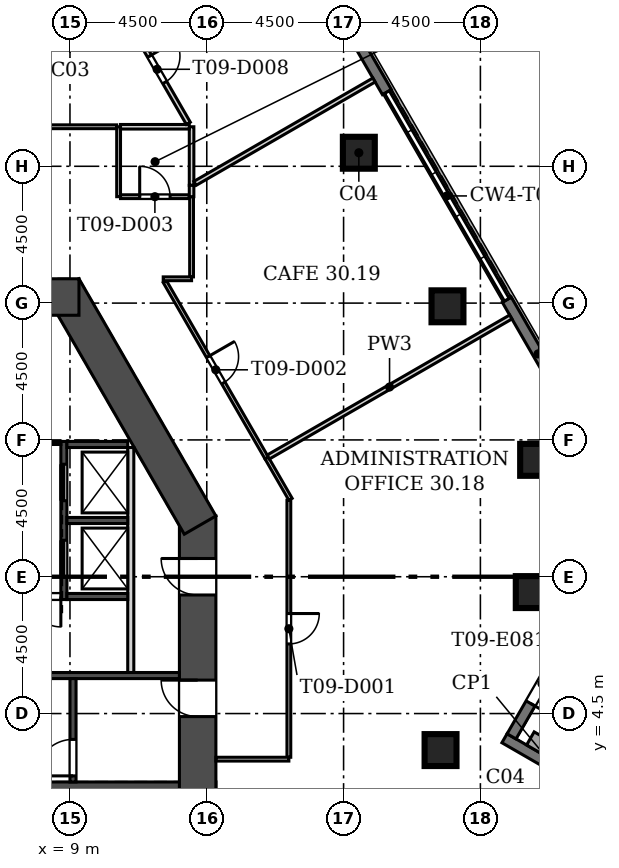
"""IFC4 building model, lengths in metres.
Left out: names, types, materials, properties, quantities, classifications, styles, units other than length and angle.
Written with IfcOpenShell. Run it as: python <this file> out.ifc"""

import sys

from ifc_helpers import new_model, si_unit, direction, frame, frame_2d, origin, origin_2d, place, context, subcontext, project, spatial, polyline, rectangle, outline, extrude, element, fill, save


model = new_model("IFC4")
c1 = context("Model", 3, precision=1e-05, world=origin(), true_north=direction((0.0, 1.0)))
c2 = subcontext(c1, "Body", "Model", "MODEL_VIEW")
j1 = project(units=[si_unit("LENGTHUNIT", "METRE"), si_unit("PLANEANGLEUNIT", "RADIAN")], contexts=[c1])
p1 = place(None, origin())
s1 = spatial("IfcSite", under=j1, at=p1, CompositionType="ELEMENT")
p2 = place(p1, origin())
s2 = spatial("IfcBuilding", under=s1, at=p2, CompositionType="ELEMENT")
p3 = place(p2, frame((0.0, 0.0, 137.5)))
s3 = spatial("IfcBuildingStorey", under=s2, at=p3, CompositionType="ELEMENT", Elevation=137.5)
for number, where, z_axis, x_axis in (
    (1, (21.19, 3.299, 0.0), (0.0, 0.0, 1.0), (1.0, 0.0, 0.0)),
    (2, (24.19, 8.495, 0.0), (0.0, 0.0, 1.0), (1.0, 0.0, 0.0)),
    (3, (24.333, 12.844, 0.0), (0.0, 0.0, 1.0), (1.0, 0.0, 0.0)),
    (4, (21.417, 17.895, 0.0), (0.0, 0.0, 1.0), (1.0, 0.0, 0.0)),
    (5, (18.502, 22.945, 0.0), (0.0, 0.0, 1.0), (1.0, 0.0, 0.0)),
):
    element("IfcColumn", number, at=place(p3, frame(where, z_axis=z_axis, x_axis=x_axis)), inside=s3, PredefinedType="COLUMN", context=c2, shape_type="SweptSolid", body=[
        extrude(rectangle(XDim=1.05, YDim=1.05, at=origin_2d()), origin(), (0.0, 0.0, 1.0), 5.4),
    ])
p4 = place(p3, frame((-13.8, 1.65, 0.0), z_axis=(0.0, 0.0, 1.0), x_axis=(1.0, 0.0, 0.0)))
e6 = element("IfcWall", 6, at=p4, inside=s3, PredefinedType="SHEAR", context=c2, shape_type="SweptSolid", body=[
    extrude(rectangle(XDim=27.6, YDim=1.2, at=frame_2d((13.8, 0.0))), origin(), (0.0, 0.0, 1.0), 5.4),
])
p5 = place(p3, frame((13.2, 1.05, 0.0), z_axis=(0.0, 0.0, 1.0), x_axis=(0.0, 1.0, 0.0)))
e7 = element("IfcWall", 7, at=p5, inside=s3, PredefinedType="SHEAR", context=c2, shape_type="SweptSolid", body=[
    extrude(rectangle(XDim=9.949, YDim=1.2, at=frame_2d((4.975, 0.0))), origin(), (0.0, 0.0, 1.0), 5.4),
])
p6 = place(p5, frame((3.35, 0.0, 0.0)))
e8 = element("IfcOpeningElement", 8, at=p6, cuts=e7, PredefinedType="OPENING", context=c2, shape_type="SweptSolid", body=[
    extrude(rectangle(XDim=1.2, YDim=2.1, at=frame_2d((0.6, 1.05))), frame((0.0, 0.61, 0.0), z_axis=(0.0, -1.0, 0.0), x_axis=(1.0, 0.0, 0.0)), (0.0, 0.0, 1.0), 1.22),
])
p7 = place(p5, frame((7.35, 0.0, 0.0)))
e9 = element("IfcOpeningElement", 9, at=p7, cuts=e7, PredefinedType="OPENING", context=c2, shape_type="SweptSolid", body=[
    extrude(rectangle(XDim=1.2, YDim=2.1, at=frame_2d((0.6, 1.05))), frame((0.0, 0.61, 0.0), z_axis=(0.0, -1.0, 0.0), x_axis=(1.0, 0.0, 0.0)), (0.0, 0.0, 1.0), 1.22),
])
p8 = place(p3, frame((13.281, 10.699, 0.0), z_axis=(0.0, 0.0, 1.0), x_axis=(-0.499998513025, 0.866026262288, 0.0)))
e10 = element("IfcWall", 10, at=p8, inside=s3, PredefinedType="SHEAR", context=c2, shape_type="SweptSolid", body=[
    extrude(rectangle(XDim=9.008, YDim=1.2, at=frame_2d((4.504, 0.0))), origin(), (0.0, 0.0, 1.0), 5.4),
])
p9 = place(p3, frame((9.296, 18.2, 0.0), z_axis=(0.0, 0.0, 1.0), x_axis=(-1.0, 0.0, 0.0)))
e11 = element("IfcWall", 11, at=p9, inside=s3, PredefinedType="SHEAR", context=c2, shape_type="SweptSolid", body=[
    extrude(rectangle(XDim=18.592, YDim=1.2, at=frame_2d((9.296, 0.0))), origin(), (0.0, 0.0, 1.0), 5.4),
])
p10 = place(p9, frame((8.596, 0.0, 0.0)))
e12 = element("IfcOpeningElement", 12, at=p10, cuts=e11, PredefinedType="OPENING", context=c2, shape_type="SweptSolid", body=[
    extrude(rectangle(XDim=1.4, YDim=2.1, at=frame_2d((0.7, 1.05))), frame((0.0, 0.61, 0.0), z_axis=(0.0, -1.0, 0.0), x_axis=(1.0, 0.0, 0.0)), (0.0, 0.0, 1.0), 1.22),
])
p11 = place(p9, frame((11.296, 0.0, 0.0)))
e13 = element("IfcOpeningElement", 13, at=p11, cuts=e11, PredefinedType="OPENING", context=c2, shape_type="SweptSolid", body=[
    extrude(rectangle(XDim=6.0, YDim=2.4, at=frame_2d((3.0, 1.2))), frame((0.0, 0.61, 0.0), z_axis=(0.0, -1.0, 0.0), x_axis=(1.0, 0.0, 0.0)), (0.0, 0.0, 1.0), 1.22),
])
p12 = place(p9, frame((1.296, 0.0, 0.0)))
e14 = element("IfcOpeningElement", 14, at=p12, cuts=e11, PredefinedType="OPENING", context=c2, shape_type="SweptSolid", body=[
    extrude(rectangle(XDim=6.0, YDim=2.4, at=frame_2d((3.0, 1.2))), frame((0.0, 0.61, 0.0), z_axis=(0.0, -1.0, 0.0), x_axis=(1.0, 0.0, 0.0)), (0.0, 0.0, 1.0), 1.22),
])
p13 = place(p3, origin())
e15 = element("IfcWall", 15, at=p13, inside=s3, PredefinedType="SOLIDWALL", context=c2, shape_type="SweptSolid", body=[
    extrude(outline(polyline([(23.208, 3.54), (23.378, 3.836), (23.673, 3.666), (26.272, 2.165), (26.272, 2.165), (25.806, 2.04), (23.208, 3.54)])), origin(), (0.0, 0.0, 1.0), 5.0),
])
p14 = place(p3, frame((23.526, 3.75, 0.0), z_axis=(0.0, 0.0, 1.0), x_axis=(0.49999894854, 0.866026010844, 0.0)))
e16 = element("IfcWall", 16, at=p14, inside=s3, PredefinedType="SOLIDWALL", context=c2, shape_type="SweptSolid", body=[
    extrude(rectangle(XDim=4.0, YDim=0.34, at=frame_2d((2.0, 0.0))), origin(), (0.0, 0.0, 1.0), 5.0),
])
p15 = place(p14, frame((1.25, 0.0, 0.0)))
e17 = element("IfcOpeningElement", 17, at=p15, cuts=e16, PredefinedType="OPENING", context=c2, shape_type="SweptSolid", body=[
    extrude(rectangle(XDim=1.5, YDim=2.4, at=frame_2d((0.75, 1.2))), frame((0.0, 0.18, 0.0), z_axis=(0.0, -1.0, 0.0), x_axis=(1.0, 0.0, 0.0)), (0.0, 0.0, 1.0), 0.36),
])
for number, where, z_axis, x_axis in (
    (18, (25.426, 14.547, 0.0), (0.0, 0.0, 1.0), (-0.5, 0.866, 0.0)),
    (19, (19.426, 24.939, 0.0), (0.0, 0.0, 1.0), (-0.5, 0.866, 0.0)),
):
    element("IfcWall", number, at=place(p3, frame(where, z_axis=z_axis, x_axis=x_axis)), inside=s3, PredefinedType="SOLIDWALL", context=c2, shape_type="SweptSolid", body=[
        extrude(rectangle(XDim=4.115, YDim=0.34, at=frame_2d((2.058, 0.0))), origin(), (0.0, 0.0, 1.0), 5.0),
    ])
p16 = place(p3, origin())
e20 = element("IfcWall", 20, at=p16, inside=s3, PredefinedType="USERDEFINED", context=c2, shape_type="SweptSolid", body=[
    extrude(outline(polyline([(24.019, 3.465), (25.318, 2.715), (25.318, 2.715), (25.751, 2.465), (27.501, 5.496), (27.751, 5.929), (26.019, 6.929), (25.769, 6.496), (27.068, 5.746), (25.568, 3.148), (24.269, 3.898), (24.019, 3.465)])), origin(), (0.0, 0.0, 1.0), 1.1),
])
p17 = place(p3, frame((11.0, 5.85, 0.0), z_axis=(0.0, 0.0, 1.0), x_axis=(0.0, 1.0, 0.0)))
e21 = element("IfcWall", 21, at=p17, inside=s3, PredefinedType="SOLIDWALL", context=c2, shape_type="SweptSolid", body=[
    extrude(rectangle(XDim=7.4, YDim=0.2, at=frame_2d((3.7, 0.0))), origin(), (0.0, 0.0, 1.0), 5.0),
])
p18 = place(p3, frame((8.8, 8.25, -0.4), z_axis=(0.0, 0.0, 1.0), x_axis=(0.0, 1.0, 0.0)))
e22 = element("IfcWall", 22, at=p18, inside=s3, PredefinedType="SOLIDWALL", context=c2, shape_type="SweptSolid", body=[
    extrude(rectangle(XDim=5.2, YDim=0.2, at=frame_2d((2.6, 0.0))), origin(), (0.0, 0.0, 1.0), 5.4),
])
p19 = place(p18, frame((0.75, 0.0, 0.4)))
e23 = element("IfcOpeningElement", 23, at=p19, cuts=e22, PredefinedType="OPENING", context=c2, shape_type="SweptSolid", body=[
    extrude(rectangle(XDim=1.2, YDim=2.1, at=frame_2d((0.6, 1.05))), frame((0.0, 0.11, 0.0), z_axis=(0.0, -1.0, 0.0), x_axis=(1.0, 0.0, 0.0)), (0.0, 0.0, 1.0), 0.22),
])
p20 = place(p18, frame((3.25, 0.0, 0.4)))
e24 = element("IfcOpeningElement", 24, at=p20, cuts=e22, PredefinedType="OPENING", context=c2, shape_type="SweptSolid", body=[
    extrude(rectangle(XDim=1.2, YDim=2.1, at=frame_2d((0.6, 1.05))), frame((0.0, 0.11, 0.0), z_axis=(0.0, -1.0, 0.0), x_axis=(1.0, 0.0, 0.0)), (0.0, 0.0, 1.0), 0.22),
])
p21 = place(p3, frame((8.9, 8.35, -0.4), z_axis=(0.0, 0.0, 1.0), x_axis=(1.0, 0.0, 0.0)))
e25 = element("IfcWall", 25, at=p21, inside=s3, PredefinedType="SOLIDWALL", context=c2, shape_type="SweptSolid", body=[
    extrude(rectangle(XDim=2.0, YDim=0.2, at=frame_2d((1.0, 0.0))), origin(), (0.0, 0.0, 1.0), 5.4),
])
p22 = place(p3, frame((1.2, 5.75, -0.4), z_axis=(0.0, 0.0, 1.0), x_axis=(1.0, 0.0, 0.0)))
e26 = element("IfcWall", 26, at=p22, inside=s3, PredefinedType="SOLIDWALL", context=c2, shape_type="SweptSolid", body=[
    extrude(rectangle(XDim=11.4, YDim=0.2, at=frame_2d((5.7, 0.0))), origin(), (0.0, 0.0, 1.0), 5.4),
])
p23 = place(p3, frame((9.1, 2.25, -0.4), z_axis=(0.0, 0.0, 1.0), x_axis=(0.0, 1.0, 0.0)))
e27 = element("IfcWall", 27, at=p23, inside=s3, PredefinedType="SOLIDWALL", context=c2, shape_type="SweptSolid", body=[
    extrude(rectangle(XDim=3.4, YDim=0.2, at=frame_2d((1.7, 0.0))), origin(), (0.0, 0.0, 1.0), 5.4),
])
p24 = place(p23, frame((0.2, 0.0, 0.4)))
e28 = element("IfcOpeningElement", 28, at=p24, cuts=e27, PredefinedType="OPENING", context=c2, shape_type="SweptSolid", body=[
    extrude(rectangle(XDim=1.2, YDim=2.1, at=frame_2d((0.6, 1.05))), frame((0.0, 0.11, 0.0), z_axis=(0.0, -1.0, 0.0), x_axis=(1.0, 0.0, 0.0)), (0.0, 0.0, 1.0), 0.22),
])
for number, where, z_axis, x_axis in (
    (29, (8.9, 10.85, -0.4), (0.0, 0.0, 1.0), (1.0, 0.0, 0.0)),
    (30, (8.9, 13.35, -0.4), (0.0, 0.0, 1.0), (1.0, 0.0, 0.0)),
):
    element("IfcWall", number, at=place(p3, frame(where, z_axis=z_axis, x_axis=x_axis)), inside=s3, PredefinedType="SOLIDWALL", context=c2, shape_type="SweptSolid", body=[
        extrude(rectangle(XDim=2.0, YDim=0.2, at=frame_2d((1.0, 0.0))), origin(), (0.0, 0.0, 1.0), 5.4),
    ])
p25 = place(p3, frame((5.9, 13.4, 0.0), z_axis=(0.0, 0.0, 1.0), x_axis=(1.0, 0.0, 0.0)))
e31 = element("IfcWall", 31, at=p25, inside=s3, PredefinedType="PARTITIONING", context=c2, shape_type="SweptSolid", body=[
    extrude(rectangle(XDim=2.8, YDim=0.1, at=frame_2d((1.4, 0.0))), origin(), (0.0, 0.0, 1.0), 5.0),
])
p26 = place(p25, frame((0.7, 0.0, 0.0)))
e32 = element("IfcOpeningElement", 32, at=p26, cuts=e31, PredefinedType="OPENING", context=c2, shape_type="SweptSolid", body=[
    extrude(rectangle(XDim=1.4, YDim=2.1, at=frame_2d((0.7, 1.05))), frame((0.0, 0.06, 0.0), z_axis=(0.0, -1.0, 0.0), x_axis=(1.0, 0.0, 0.0)), (0.0, 0.0, 1.0), 0.12),
])
p27 = place(p3, frame((5.9, 8.35, 0.0), z_axis=(0.0, 0.0, 1.0), x_axis=(1.0, 0.0, 0.0)))
e33 = element("IfcWall", 33, at=p27, inside=s3, PredefinedType="SOLIDWALL", context=c2, shape_type="SweptSolid", body=[
    extrude(rectangle(XDim=2.8, YDim=0.2, at=frame_2d((1.4, 0.0))), origin(), (0.0, 0.0, 1.0), 5.0),
])
p28 = place(p27, frame((1.8, 0.0, 0.0)))
e34 = element("IfcOpeningElement", 34, at=p28, cuts=e33, PredefinedType="OPENING", context=c2, shape_type="SweptSolid", body=[
    extrude(rectangle(XDim=1.0, YDim=2.1, at=frame_2d((0.5, 1.05))), frame((0.0, 0.11, 0.0), z_axis=(0.0, -1.0, 0.0), x_axis=(1.0, 0.0, 0.0)), (0.0, 0.0, 1.0), 0.22),
])
p29 = place(p3, frame((15.47, 12.906, 0.0), z_axis=(0.0, 0.0, 1.0), x_axis=(0.500072733165, -0.865983407199, 0.0)))
e35 = element("IfcWall", 35, at=p29, inside=s3, PredefinedType="PARTITIONING", context=c2, shape_type="SweptSolid", body=[
    extrude(rectangle(XDim=1.569, YDim=0.125, at=frame_2d((0.784, 0.0))), origin(), (0.0, 0.0, 1.0), 5.0),
])
p30 = place(p3, frame((16.2, 11.517, 0.0), z_axis=(0.0, 0.0, 1.0), x_axis=(0.0, -1.0, 0.0)))
e36 = element("IfcWall", 36, at=p30, inside=s3, PredefinedType="PARTITIONING", context=c2, shape_type="SweptSolid", body=[
    extrude(rectangle(XDim=8.455, YDim=0.125, at=frame_2d((4.227, 0.0))), origin(), (0.0, 0.0, 1.0), 5.0),
])
p31 = place(p30, frame((3.727, 0.0, 0.0)))
e37 = element("IfcOpeningElement", 37, at=p31, cuts=e36, PredefinedType="OPENING", context=c2, shape_type="SweptSolid", body=[
    extrude(rectangle(XDim=1.0, YDim=2.1, at=frame_2d((0.5, 1.05))), frame((0.0, 0.073, 0.0), z_axis=(0.0, -1.0, 0.0), x_axis=(1.0, 0.0, 0.0)), (0.0, 0.0, 1.0), 0.145),
])
p32 = place(p3, frame((16.2, 3.0, 0.0), z_axis=(0.0, 0.0, 1.0), x_axis=(-1.0, 0.0, 0.0)))
e38 = element("IfcWall", 38, at=p32, inside=s3, PredefinedType="PARTITIONING", context=c2, shape_type="SweptSolid", body=[
    extrude(rectangle(XDim=2.4, YDim=0.125, at=frame_2d((1.2, 0.0))), origin(), (0.0, 0.0, 1.0), 5.0),
])
p33 = place(p3, frame((12.122, 18.706, 0.0), z_axis=(0.0, 0.0, 1.0), x_axis=(0.499989655977, -0.866031375826, 0.0)))
e39 = element("IfcWall", 39, at=p33, inside=s3, PredefinedType="PARTITIONING", context=c2, shape_type="SweptSolid", body=[
    extrude(rectangle(XDim=6.697, YDim=0.125, at=frame_2d((3.348, 0.0))), origin(), (0.0, 0.0, 1.0), 5.0),
])
p34 = place(p33, frame((2.848, 0.0, 0.0)))
e40 = element("IfcOpeningElement", 40, at=p34, cuts=e39, PredefinedType="OPENING", context=c2, shape_type="SweptSolid", body=[
    extrude(rectangle(XDim=1.0, YDim=2.1, at=frame_2d((0.5, 1.05))), frame((0.0, 0.073, 0.0), z_axis=(0.0, -1.0, 0.0), x_axis=(1.0, 0.0, 0.0)), (0.0, 0.0, 1.0), 0.145),
])
p35 = place(p3, frame((10.6, 23.8, 0.0), z_axis=(0.0, 0.0, 1.0), x_axis=(0.0, -1.0, 0.0)))
e41 = element("IfcWall", 41, at=p35, inside=s3, PredefinedType="PARTITIONING", context=c2, shape_type="SweptSolid", body=[
    extrude(rectangle(XDim=2.3, YDim=0.125, at=frame_2d((1.15, 0.0))), origin(), (0.0, 0.0, 1.0), 5.0),
])
p36 = place(p3, frame((10.663, 21.5, 0.0), z_axis=(0.0, 0.0, 1.0), x_axis=(1.0, 0.0, 0.0)))
e42 = element("IfcWall", 42, at=p36, inside=s3, PredefinedType="PARTITIONING", context=c2, shape_type="SweptSolid", body=[
    extrude(rectangle(XDim=2.262, YDim=0.125, at=frame_2d((1.131, 0.0))), origin(), (0.0, 0.0, 1.0), 5.0),
])
p37 = place(p36, frame((0.631, 0.0, 0.0)))
e43 = element("IfcOpeningElement", 43, at=p37, cuts=e42, PredefinedType="OPENING", context=c2, shape_type="SweptSolid", body=[
    extrude(rectangle(XDim=1.0, YDim=2.1, at=frame_2d((0.5, 1.05))), frame((0.0, 0.073, 0.0), z_axis=(0.0, -1.0, 0.0), x_axis=(1.0, 0.0, 0.0)), (0.0, 0.0, 1.0), 0.145),
])
p38 = place(p3, frame((-11.804, 23.8, 0.0), z_axis=(0.0, 0.0, 1.0), x_axis=(1.0, 0.0, 0.0)))
e44 = element("IfcWall", 44, at=p38, inside=s3, PredefinedType="PARTITIONING", context=c2, shape_type="SweptSolid", body=[
    extrude(rectangle(XDim=22.342, YDim=0.125, at=frame_2d((11.171, 0.0))), origin(), (0.0, 0.0, 1.0), 5.0),
])
p39 = place(p38, frame((7.538, 0.0, 0.0)))
e45 = element("IfcOpeningElement", 45, at=p39, cuts=e44, PredefinedType="OPENING", context=c2, shape_type="SweptSolid", body=[
    extrude(rectangle(XDim=1.8, YDim=2.1, at=frame_2d((0.9, 1.05))), frame((0.0, 0.073, 0.0), z_axis=(0.0, -1.0, 0.0), x_axis=(1.0, 0.0, 0.0)), (0.0, 0.0, 1.0), 0.145),
])
p40 = place(p38, frame((10.271, 0.0, 0.0)))
e46 = element("IfcOpeningElement", 46, at=p40, cuts=e44, PredefinedType="OPENING", context=c2, shape_type="SweptSolid", body=[
    extrude(rectangle(XDim=1.8, YDim=2.1, at=frame_2d((0.9, 1.05))), frame((0.0, 0.073, 0.0), z_axis=(0.0, -1.0, 0.0), x_axis=(1.0, 0.0, 0.0)), (0.0, 0.0, 1.0), 0.145),
])
p41 = place(p3, frame((13.0, 21.5, 0.0), z_axis=(0.0, 0.0, 1.0), x_axis=(0.0, -1.0, 0.0)))
e47 = element("IfcWall", 47, at=p41, inside=s3, PredefinedType="PARTITIONING", context=c2, shape_type="SweptSolid", body=[
    extrude(rectangle(XDim=2.637, YDim=0.125, at=frame_2d((1.319, 0.0))), origin(), (0.0, 0.0, 1.0), 5.0),
])
p42 = place(p3, frame((13.0, 18.8, 0.0), z_axis=(0.0, 0.0, 1.0), x_axis=(-1.0, 0.0, 0.0)))
e48 = element("IfcWall", 48, at=p42, inside=s3, PredefinedType="PARTITIONING", context=c2, shape_type="SweptSolid", body=[
    extrude(rectangle(XDim=0.933, YDim=0.125, at=frame_2d((0.466, 0.0))), origin(), (0.0, 0.0, 1.0), 5.0),
])
p43 = place(p3, frame((13.0, 23.8, 0.0), z_axis=(0.0, 0.0, 1.0), x_axis=(0.0, -1.0, 0.0)))
e49 = element("IfcWall", 49, at=p43, inside=s3, PredefinedType="PARTITIONING", context=c2, shape_type="SweptSolid", body=[
    extrude(rectangle(XDim=1.927, YDim=0.15, at=frame_2d((0.964, 0.0))), origin(), (0.0, 0.0, 1.0), 5.0),
])
p44 = place(p3, frame((10.663, 23.8, 0.0), z_axis=(0.0, 0.0, 1.0), x_axis=(1.0, 0.0, 0.0)))
e50 = element("IfcWall", 50, at=p44, inside=s3, PredefinedType="PARTITIONING", context=c2, shape_type="SweptSolid", body=[
    extrude(rectangle(XDim=2.261, YDim=0.15, at=frame_2d((1.131, 0.0))), origin(), (0.0, 0.0, 1.0), 5.0),
])
p45 = place(p3, frame((13.0, 21.873, 0.0), z_axis=(0.0, 0.0, 1.0), x_axis=(0.0, -1.0, 0.0)))
e51 = element("IfcWall", 51, at=p45, inside=s3, PredefinedType="PARTITIONING", context=c2, shape_type="SweptSolid", body=[
    extrude(rectangle(XDim=0.373, YDim=0.15, at=frame_2d((0.187, 0.0))), origin(), (0.0, 0.0, 1.0), 5.0),
])
p46 = place(p3, frame((12.894, 23.913, 0.0), z_axis=(0.0, 0.0, 1.0), x_axis=(-0.499983290286, 0.866035050927, 0.0)))
e52 = element("IfcWall", 52, at=p46, inside=s3, PredefinedType="PARTITIONING", context=c2, shape_type="SweptSolid", body=[
    extrude(rectangle(XDim=4.105, YDim=0.15, at=frame_2d((2.053, 0.0))), origin(), (0.0, 0.0, 1.0), 5.0),
])
p47 = place(p46, frame((1.552, 0.0, 0.0)))
e53 = element("IfcOpeningElement", 53, at=p47, cuts=e52, PredefinedType="OPENING", context=c2, shape_type="SweptSolid", body=[
    extrude(rectangle(XDim=1.0, YDim=2.1, at=frame_2d((0.5, 1.05))), frame((0.0, 0.085, 0.0), z_axis=(0.0, -1.0, 0.0), x_axis=(1.0, 0.0, 0.0)), (0.0, 0.0, 1.0), 0.17),
])
p48 = place(p3, frame((19.0, 25.337, 0.0), z_axis=(0.0, 0.0, 1.0), x_axis=(-0.866028893315, -0.499993955907, 0.0)))
e54 = element("IfcWall", 54, at=p48, inside=s3, PredefinedType="PARTITIONING", context=c2, shape_type="SweptSolid", body=[
    extrude(rectangle(XDim=6.798, YDim=0.15, at=frame_2d((3.399, 0.0))), origin(), (0.0, 0.0, 1.0), 5.0),
])
p49 = place(p3, frame((15.524, 12.938, 0.0), z_axis=(0.0, 0.0, 1.0), x_axis=(0.866037264291, 0.499979456437, 0.0)))
e55 = element("IfcWall", 55, at=p49, inside=s3, PredefinedType="PARTITIONING", context=c2, shape_type="SweptSolid", body=[
    extrude(rectangle(XDim=9.21, YDim=0.15, at=frame_2d((4.605, 0.0))), origin(), (0.0, 0.0, 1.0), 5.0),
])
p50 = place(p15, frame((1.5, 0.0, 0.0), z_axis=(0.0, 0.0, 1.0), x_axis=(-1.0, 0.0, 0.0)))
e56 = element("IfcDoor", 56, at=p50, inside=s3, OperationType="DOUBLE_DOOR_SINGLE_SWING", PredefinedType="DOOR", context=c2, shape_type="SweptSolid", body=[
    extrude(rectangle(XDim=1.5, YDim=2.4, at=frame_2d((0.75, 1.2))), frame((0.0, 0.025, 0.0), z_axis=(0.0, -1.0, 0.0), x_axis=(1.0, 0.0, 0.0)), (0.0, 0.0, 1.0), 0.05),
])
fill(e17, e56)
p51 = place(p19, origin())
e57 = element("IfcDoor", 57, at=p51, inside=s3, OperationType="SLIDING_TO_LEFT", PredefinedType="DOOR", context=c2, shape_type="SweptSolid", body=[
    extrude(rectangle(XDim=1.2, YDim=2.1, at=frame_2d((0.6, 1.05))), frame((0.0, 0.025, 0.0), z_axis=(0.0, -1.0, 0.0), x_axis=(1.0, 0.0, 0.0)), (0.0, 0.0, 1.0), 0.05),
])
fill(e23, e57)
p52 = place(p20, origin())
e58 = element("IfcDoor", 58, at=p52, inside=s3, OperationType="SLIDING_TO_LEFT", PredefinedType="DOOR", context=c2, shape_type="SweptSolid", body=[
    extrude(rectangle(XDim=1.2, YDim=2.1, at=frame_2d((0.6, 1.05))), frame((0.0, 0.025, 0.0), z_axis=(0.0, -1.0, 0.0), x_axis=(1.0, 0.0, 0.0)), (0.0, 0.0, 1.0), 0.05),
])
fill(e24, e58)
p53 = place(p28, frame((1.0, 0.0, 0.0), z_axis=(0.0, 0.0, 1.0), x_axis=(-1.0, 0.0, 0.0)))
e59 = element("IfcDoor", 59, at=p53, inside=s3, OperationType="SINGLE_SWING_LEFT", PredefinedType="DOOR", context=c2, shape_type="SweptSolid", body=[
    extrude(rectangle(XDim=1.0, YDim=2.1, at=frame_2d((0.5, 1.05))), frame((0.0, 0.025, 0.0), z_axis=(0.0, -1.0, 0.0), x_axis=(1.0, 0.0, 0.0)), (0.0, 0.0, 1.0), 0.05),
])
fill(e34, e59)
p54 = place(p6, origin())
e60 = element("IfcDoor", 60, at=p54, inside=s3, OperationType="SINGLE_SWING_RIGHT", PredefinedType="DOOR", context=c2, shape_type="SweptSolid", body=[
    extrude(rectangle(XDim=1.2, YDim=2.1, at=frame_2d((0.6, 1.05))), frame((0.0, 0.025, 0.0), z_axis=(0.0, -1.0, 0.0), x_axis=(1.0, 0.0, 0.0)), (0.0, 0.0, 1.0), 0.05),
])
fill(e8, e60)
p55 = place(p24, origin())
e61 = element("IfcDoor", 61, at=p55, inside=s3, OperationType="SINGLE_SWING_LEFT", PredefinedType="DOOR", context=c2, shape_type="SweptSolid", body=[
    extrude(rectangle(XDim=1.2, YDim=2.1, at=frame_2d((0.6, 1.05))), frame((0.0, 0.025, 0.0), z_axis=(0.0, -1.0, 0.0), x_axis=(1.0, 0.0, 0.0)), (0.0, 0.0, 1.0), 0.05),
])
fill(e28, e61)
p56 = place(p7, origin())
e62 = element("IfcDoor", 62, at=p56, inside=s3, OperationType="SINGLE_SWING_RIGHT", PredefinedType="DOOR", context=c2, shape_type="SweptSolid", body=[
    extrude(rectangle(XDim=1.2, YDim=2.1, at=frame_2d((0.6, 1.05))), frame((0.0, 0.025, 0.0), z_axis=(0.0, -1.0, 0.0), x_axis=(1.0, 0.0, 0.0)), (0.0, 0.0, 1.0), 0.05),
])
fill(e9, e62)
p57 = place(p31, origin())
e63 = element("IfcDoor", 63, at=p57, inside=s3, OperationType="SINGLE_SWING_LEFT", PredefinedType="DOOR", context=c2, shape_type="SweptSolid", body=[
    extrude(rectangle(XDim=1.0, YDim=2.1, at=frame_2d((0.5, 1.05))), frame((0.0, 0.025, 0.0), z_axis=(0.0, -1.0, 0.0), x_axis=(1.0, 0.0, 0.0)), (0.0, 0.0, 1.0), 0.05),
])
fill(e37, e63)
p58 = place(p34, origin())
e64 = element("IfcDoor", 64, at=p58, inside=s3, OperationType="SINGLE_SWING_LEFT", PredefinedType="DOOR", context=c2, shape_type="SweptSolid", body=[
    extrude(rectangle(XDim=1.0, YDim=2.1, at=frame_2d((0.5, 1.05))), frame((0.0, 0.025, 0.0), z_axis=(0.0, -1.0, 0.0), x_axis=(1.0, 0.0, 0.0)), (0.0, 0.0, 1.0), 0.05),
])
fill(e40, e64)
p59 = place(p37, origin())
e65 = element("IfcDoor", 65, at=p59, inside=s3, OperationType="SINGLE_SWING_LEFT", PredefinedType="DOOR", context=c2, shape_type="SweptSolid", body=[
    extrude(rectangle(XDim=1.0, YDim=2.1, at=frame_2d((0.5, 1.05))), frame((0.0, 0.025, 0.0), z_axis=(0.0, -1.0, 0.0), x_axis=(1.0, 0.0, 0.0)), (0.0, 0.0, 1.0), 0.05),
])
fill(e43, e65)
p60 = place(p47, frame((1.0, 0.0, 0.0), z_axis=(0.0, 0.0, 1.0), x_axis=(-1.0, 0.0, 0.0)))
e66 = element("IfcDoor", 66, at=p60, inside=s3, OperationType="SINGLE_SWING_LEFT", PredefinedType="DOOR", context=c2, shape_type="SweptSolid", body=[
    extrude(rectangle(XDim=1.0, YDim=2.1, at=frame_2d((0.5, 1.05))), frame((0.0, 0.025, 0.0), z_axis=(0.0, -1.0, 0.0), x_axis=(1.0, 0.0, 0.0)), (0.0, 0.0, 1.0), 0.05),
])
fill(e53, e66)
save(model, sys.argv[1])
